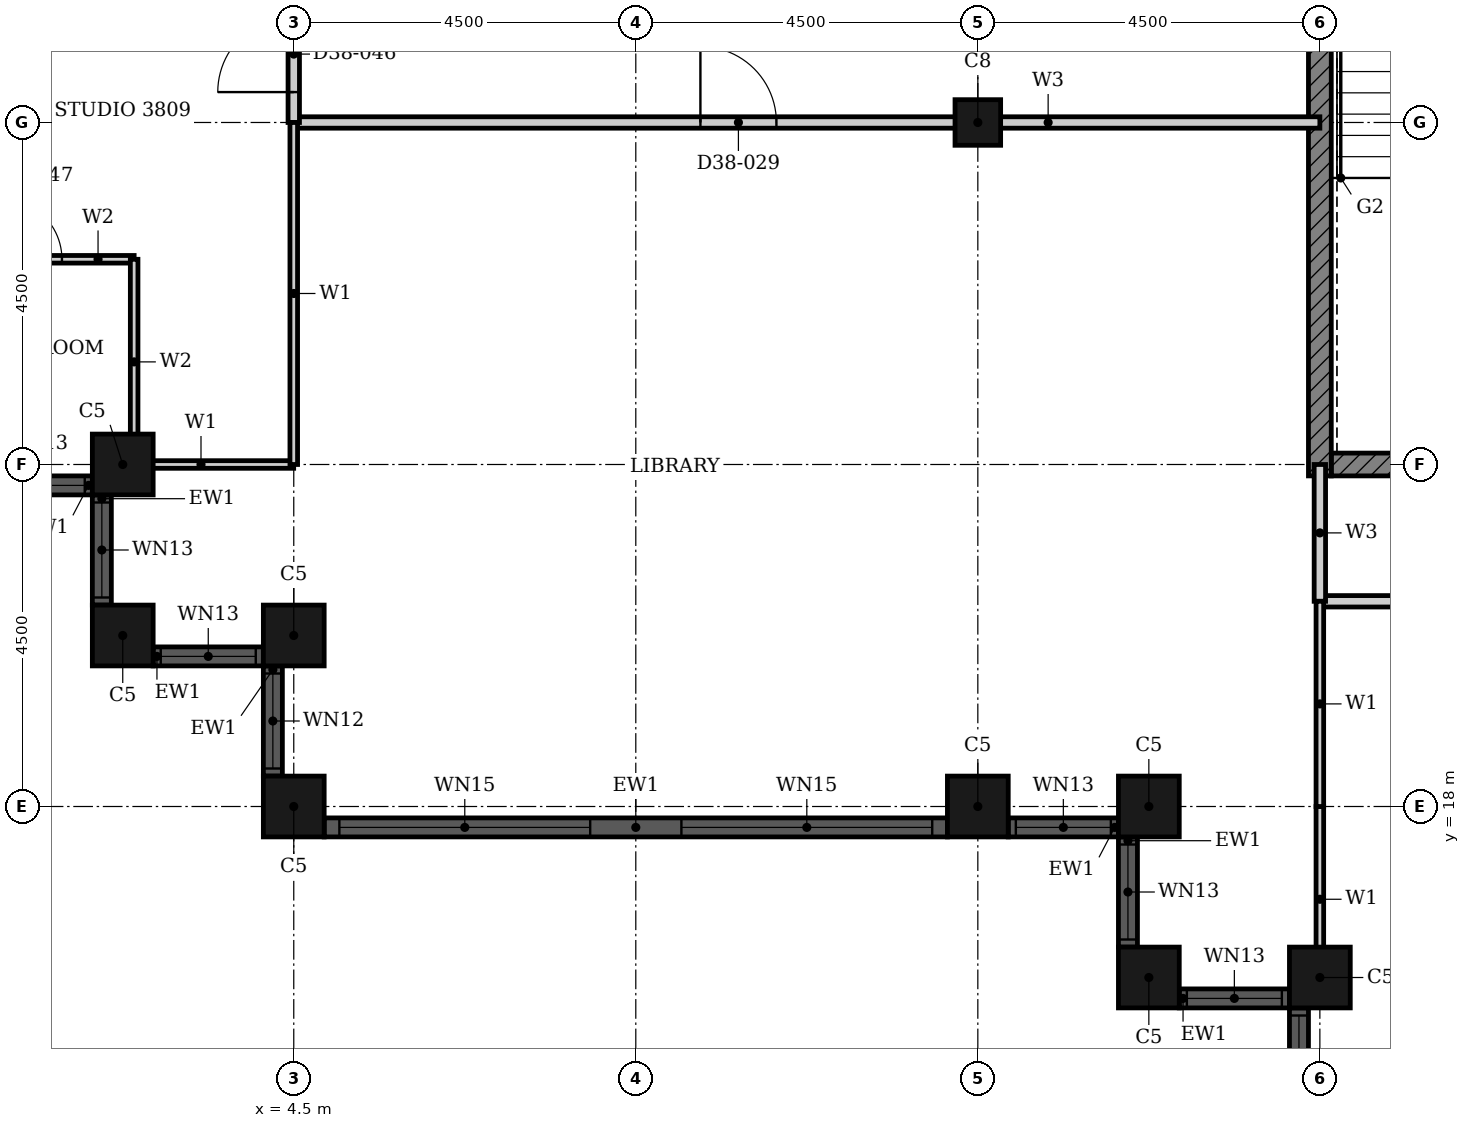
"""IFC4 building model, lengths in metres.
Left out: names, types, materials, properties, quantities, classifications, styles, units other than length and angle.
Written with IfcOpenShell. Run it as: python <this file> out.ifc"""

import sys

from ifc_helpers import new_model, si_unit, direction, frame, frame_2d, origin, origin_2d, place, context, subcontext, project, spatial, rectangle, hollow_rectangle, extrude, element, fill, save


model = new_model("IFC4")
c1 = context("Model", 3, precision=1e-05, world=origin(), true_north=direction((0.0, 1.0)))
c2 = subcontext(c1, "Body", "Model", "MODEL_VIEW")
j1 = project(units=[si_unit("LENGTHUNIT", "METRE"), si_unit("PLANEANGLEUNIT", "RADIAN")], contexts=[c1])
p1 = place(None, origin())
s1 = spatial("IfcSite", under=j1, at=p1, CompositionType="ELEMENT")
p2 = place(p1, origin())
s2 = spatial("IfcBuilding", under=s1, at=p2, CompositionType="ELEMENT")
p3 = place(p2, frame((0.0, 0.0, 154.3)))
s3 = spatial("IfcBuildingStorey", under=s2, at=p3, CompositionType="ELEMENT", Elevation=154.3)
for number, where, z_axis, x_axis in (
    (1, (2.25, 22.5, 0.0), (0.0, 0.0, 1.0), (1.0, 0.0, 0.0)),
    (2, (2.25, 20.25, 0.0), (0.0, 0.0, 1.0), (1.0, 0.0, 0.0)),
    (3, (4.5, 20.25, 0.0), (0.0, 0.0, 1.0), (1.0, 0.0, 0.0)),
    (4, (4.5, 18.0, 0.0), (0.0, 0.0, 1.0), (1.0, 0.0, 0.0)),
    (5, (13.5, 18.0, 0.0), (0.0, 0.0, 1.0), (1.0, 0.0, 0.0)),
    (6, (15.75, 18.0, 0.0), (0.0, 0.0, 1.0), (1.0, 0.0, 0.0)),
    (7, (15.75, 15.75, 0.0), (0.0, 0.0, 1.0), (1.0, 0.0, 0.0)),
    (8, (18.0, 15.75, 0.0), (0.0, 0.0, 1.0), (1.0, 0.0, 0.0)),
):
    element("IfcColumn", number, at=place(p3, frame(where, z_axis=z_axis, x_axis=x_axis)), inside=s3, PredefinedType="COLUMN", context=c2, shape_type="SweptSolid", body=[
        extrude(hollow_rectangle(XDim=0.8, YDim=0.8, WallThickness=0.025, at=origin_2d()), origin(), (0.0, 0.0, 1.0), 3.7),
    ])
p4 = place(p3, frame((13.5, 27.0, 0.0), z_axis=(0.0, 0.0, 1.0), x_axis=(1.0, 0.0, 0.0)))
e9 = element("IfcColumn", 9, at=p4, inside=s3, PredefinedType="COLUMN", context=c2, shape_type="SweptSolid", body=[
    extrude(hollow_rectangle(XDim=0.6, YDim=0.6, WallThickness=0.02, at=origin_2d()), origin(), (0.0, 0.0, 1.0), 3.7),
])
p5 = place(p3, frame((0.4, 22.225, 0.0), z_axis=(0.0, 0.0, 1.0), x_axis=(1.0, 0.0, 0.0)))
e10 = element("IfcWall", 10, at=p5, inside=s3, PredefinedType="SOLIDWALL", context=c2, shape_type="SweptSolid", body=[
    extrude(rectangle(XDim=1.45, YDim=0.25, at=frame_2d((0.725, 0.0))), origin(), (0.0, 0.0, 1.0), 3.7),
])
p6 = place(p5, frame((0.1, 0.0, 0.9)))
e11 = element("IfcOpeningElement", 11, at=p6, cuts=e10, PredefinedType="OPENING", context=c2, shape_type="SweptSolid", body=[
    extrude(rectangle(XDim=1.25, YDim=1.85, at=frame_2d((0.625, 0.925))), frame((0.0, 0.135, 0.0), z_axis=(0.0, -1.0, 0.0), x_axis=(1.0, 0.0, 0.0)), (0.0, 0.0, 1.0), 0.27),
])
p7 = place(p3, frame((1.975, 22.1, 0.0), z_axis=(0.0, 0.0, 1.0), x_axis=(0.0, -1.0, 0.0)))
e12 = element("IfcWall", 12, at=p7, inside=s3, PredefinedType="SOLIDWALL", context=c2, shape_type="SweptSolid", body=[
    extrude(rectangle(XDim=1.45, YDim=0.25, at=frame_2d((0.725, 0.0))), origin(), (0.0, 0.0, 1.0), 3.7),
])
p8 = place(p7, frame((0.1, 0.0, 0.9)))
e13 = element("IfcOpeningElement", 13, at=p8, cuts=e12, PredefinedType="OPENING", context=c2, shape_type="SweptSolid", body=[
    extrude(rectangle(XDim=1.25, YDim=1.85, at=frame_2d((0.625, 0.925))), frame((0.0, 0.135, 0.0), z_axis=(0.0, -1.0, 0.0), x_axis=(1.0, 0.0, 0.0)), (0.0, 0.0, 1.0), 0.27),
])
p9 = place(p3, frame((2.65, 19.975, 0.0), z_axis=(0.0, 0.0, 1.0), x_axis=(1.0, 0.0, 0.0)))
e14 = element("IfcWall", 14, at=p9, inside=s3, PredefinedType="SOLIDWALL", context=c2, shape_type="SweptSolid", body=[
    extrude(rectangle(XDim=1.45, YDim=0.25, at=frame_2d((0.725, 0.0))), origin(), (0.0, 0.0, 1.0), 3.7),
])
p10 = place(p9, frame((0.1, 0.0, 0.9)))
e15 = element("IfcOpeningElement", 15, at=p10, cuts=e14, PredefinedType="OPENING", context=c2, shape_type="SweptSolid", body=[
    extrude(rectangle(XDim=1.25, YDim=1.85, at=frame_2d((0.625, 0.925))), frame((0.0, 0.135, 0.0), z_axis=(0.0, -1.0, 0.0), x_axis=(1.0, 0.0, 0.0)), (0.0, 0.0, 1.0), 0.27),
])
p11 = place(p3, frame((4.225, 19.85, 0.0), z_axis=(0.0, 0.0, 1.0), x_axis=(0.0, -1.0, 0.0)))
e16 = element("IfcWall", 16, at=p11, inside=s3, PredefinedType="SOLIDWALL", context=c2, shape_type="SweptSolid", body=[
    extrude(rectangle(XDim=1.45, YDim=0.25, at=frame_2d((0.725, 0.0))), origin(), (0.0, 0.0, 1.0), 3.7),
])
p12 = place(p11, frame((0.1, 0.0, 0.9)))
e17 = element("IfcOpeningElement", 17, at=p12, cuts=e16, PredefinedType="OPENING", context=c2, shape_type="SweptSolid", body=[
    extrude(rectangle(XDim=1.25, YDim=2.08, at=frame_2d((0.625, 1.04))), frame((0.0, 0.135, 0.0), z_axis=(0.0, -1.0, 0.0), x_axis=(1.0, 0.0, 0.0)), (0.0, 0.0, 1.0), 0.27),
])
p13 = place(p3, frame((4.9, 17.725, 0.0), z_axis=(0.0, 0.0, 1.0), x_axis=(1.0, 0.0, 0.0)))
e18 = element("IfcWall", 18, at=p13, inside=s3, PredefinedType="SOLIDWALL", context=c2, shape_type="SweptSolid", body=[
    extrude(rectangle(XDim=8.2, YDim=0.25, at=frame_2d((4.1, 0.0))), origin(), (0.0, 0.0, 1.0), 3.7),
])
p14 = place(p13, frame((0.2, 0.0, 0.45)))
e19 = element("IfcOpeningElement", 19, at=p14, cuts=e18, PredefinedType="OPENING", context=c2, shape_type="SweptSolid", body=[
    extrude(rectangle(XDim=3.3, YDim=2.3, at=frame_2d((1.65, 1.15))), frame((0.0, 0.135, 0.0), z_axis=(0.0, -1.0, 0.0), x_axis=(1.0, 0.0, 0.0)), (0.0, 0.0, 1.0), 0.27),
])
p15 = place(p13, frame((4.7, 0.0, 0.45)))
e20 = element("IfcOpeningElement", 20, at=p15, cuts=e18, PredefinedType="OPENING", context=c2, shape_type="SweptSolid", body=[
    extrude(rectangle(XDim=3.3, YDim=2.3, at=frame_2d((1.65, 1.15))), frame((0.0, 0.135, 0.0), z_axis=(0.0, -1.0, 0.0), x_axis=(1.0, 0.0, 0.0)), (0.0, 0.0, 1.0), 0.27),
])
p16 = place(p3, frame((13.9, 17.725, 0.0), z_axis=(0.0, 0.0, 1.0), x_axis=(1.0, 0.0, 0.0)))
e21 = element("IfcWall", 21, at=p16, inside=s3, PredefinedType="SOLIDWALL", context=c2, shape_type="SweptSolid", body=[
    extrude(rectangle(XDim=1.45, YDim=0.25, at=frame_2d((0.725, 0.0))), origin(), (0.0, 0.0, 1.0), 3.7),
])
p17 = place(p16, frame((0.1, 0.0, 0.9)))
e22 = element("IfcOpeningElement", 22, at=p17, cuts=e21, PredefinedType="OPENING", context=c2, shape_type="SweptSolid", body=[
    extrude(rectangle(XDim=1.25, YDim=1.85, at=frame_2d((0.625, 0.925))), frame((0.0, 0.135, 0.0), z_axis=(0.0, -1.0, 0.0), x_axis=(1.0, 0.0, 0.0)), (0.0, 0.0, 1.0), 0.27),
])
p18 = place(p3, frame((15.475, 17.6, 0.0), z_axis=(0.0, 0.0, 1.0), x_axis=(0.0, -1.0, 0.0)))
e23 = element("IfcWall", 23, at=p18, inside=s3, PredefinedType="SOLIDWALL", context=c2, shape_type="SweptSolid", body=[
    extrude(rectangle(XDim=1.45, YDim=0.25, at=frame_2d((0.725, 0.0))), origin(), (0.0, 0.0, 1.0), 3.7),
])
p19 = place(p18, frame((0.1, 0.0, 0.9)))
e24 = element("IfcOpeningElement", 24, at=p19, cuts=e23, PredefinedType="OPENING", context=c2, shape_type="SweptSolid", body=[
    extrude(rectangle(XDim=1.25, YDim=1.85, at=frame_2d((0.625, 0.925))), frame((0.0, 0.135, 0.0), z_axis=(0.0, -1.0, 0.0), x_axis=(1.0, 0.0, 0.0)), (0.0, 0.0, 1.0), 0.27),
])
p20 = place(p3, frame((16.15, 15.475, 0.0), z_axis=(0.0, 0.0, 1.0), x_axis=(1.0, 0.0, 0.0)))
e25 = element("IfcWall", 25, at=p20, inside=s3, PredefinedType="SOLIDWALL", context=c2, shape_type="SweptSolid", body=[
    extrude(rectangle(XDim=1.45, YDim=0.25, at=frame_2d((0.725, 0.0))), origin(), (0.0, 0.0, 1.0), 3.7),
])
p21 = place(p20, frame((0.1, 0.0, 0.9)))
e26 = element("IfcOpeningElement", 26, at=p21, cuts=e25, PredefinedType="OPENING", context=c2, shape_type="SweptSolid", body=[
    extrude(rectangle(XDim=1.25, YDim=1.85, at=frame_2d((0.625, 0.925))), frame((0.0, 0.135, 0.0), z_axis=(0.0, -1.0, 0.0), x_axis=(1.0, 0.0, 0.0)), (0.0, 0.0, 1.0), 0.27),
])
p22 = place(p3, frame((17.725, 15.35, 0.0), z_axis=(0.0, 0.0, 1.0), x_axis=(0.0, -1.0, 0.0)))
e27 = element("IfcWall", 27, at=p22, inside=s3, PredefinedType="SOLIDWALL", context=c2, shape_type="SweptSolid", body=[
    extrude(rectangle(XDim=1.45, YDim=0.25, at=frame_2d((0.725, 0.0))), origin(), (0.0, 0.0, 1.0), 3.7),
])
p23 = place(p22, frame((0.1, 0.0, 0.9)))
e28 = element("IfcOpeningElement", 28, at=p23, cuts=e27, PredefinedType="OPENING", context=c2, shape_type="SweptSolid", body=[
    extrude(rectangle(XDim=1.25, YDim=1.85, at=frame_2d((0.625, 0.925))), frame((0.0, 0.135, 0.0), z_axis=(0.0, -1.0, 0.0), x_axis=(1.0, 0.0, 0.0)), (0.0, 0.0, 1.0), 0.27),
])
p24 = place(p3, frame((18.15, 22.5, 0.0), z_axis=(0.0, 0.0, 1.0), x_axis=(1.0, 0.0, 0.0)))
e29 = element("IfcWall", 29, at=p24, inside=s3, PredefinedType="SHEAR", context=c2, shape_type="SweptSolid", body=[
    extrude(rectangle(XDim=4.225, YDim=0.3, at=frame_2d((2.113, 0.0))), origin(), (0.0, 0.0, 1.0), 3.4),
])
p25 = place(p3, frame((18.0, 22.35, 0.0), z_axis=(0.0, 0.0, 1.0), x_axis=(0.0, 1.0, 0.0)))
e30 = element("IfcWall", 30, at=p25, inside=s3, PredefinedType="SHEAR", context=c2, shape_type="SweptSolid", body=[
    extrude(rectangle(XDim=9.3, YDim=0.3, at=frame_2d((4.65, 0.0))), origin(), (0.0, 0.0, 1.0), 3.4),
])
p26 = place(p3, frame((18.0, 20.7, 0.0), z_axis=(0.0, 0.0, 1.0), x_axis=(1.0, 0.0, 0.0)))
e31 = element("IfcWall", 31, at=p26, inside=s3, PredefinedType="PARTITIONING", context=c2, shape_type="SweptSolid", body=[
    extrude(rectangle(XDim=13.5, YDim=0.15, at=frame_2d((6.75, 0.0))), origin(), (0.0, 0.0, 1.0), 3.4),
])
p27 = place(p26, frame((6.25, 0.0, 0.0)))
e32 = element("IfcOpeningElement", 32, at=p27, cuts=e31, PredefinedType="OPENING", context=c2, shape_type="SweptSolid", body=[
    extrude(rectangle(XDim=1.0, YDim=2.1, at=frame_2d((0.5, 1.05))), frame((0.0, 0.085, 0.0), z_axis=(0.0, -1.0, 0.0), x_axis=(1.0, 0.0, 0.0)), (0.0, 0.0, 1.0), 0.17),
])
p28 = place(p3, frame((4.5, 27.0, 0.0), z_axis=(0.0, 0.0, 1.0), x_axis=(1.0, 0.0, 0.0)))
e33 = element("IfcWall", 33, at=p28, inside=s3, PredefinedType="PARTITIONING", context=c2, shape_type="SweptSolid", body=[
    extrude(rectangle(XDim=13.5, YDim=0.15, at=frame_2d((6.75, 0.0))), origin(), (0.0, 0.0, 1.0), 2.68),
])
p29 = place(p28, frame((5.35, 0.0, 0.0)))
e34 = element("IfcOpeningElement", 34, at=p29, cuts=e33, PredefinedType="OPENING", context=c2, shape_type="SweptSolid", body=[
    extrude(rectangle(XDim=1.0, YDim=2.1, at=frame_2d((0.5, 1.05))), frame((0.0, 0.085, 0.0), z_axis=(0.0, -1.0, 0.0), x_axis=(1.0, 0.0, 0.0)), (0.0, 0.0, 1.0), 0.17),
])
p30 = place(p3, frame((18.0, 20.7, 0.0), z_axis=(0.0, 0.0, 1.0), x_axis=(0.0, 1.0, 0.0)))
e35 = element("IfcWall", 35, at=p30, inside=s3, PredefinedType="PARTITIONING", context=c2, shape_type="SweptSolid", body=[
    extrude(rectangle(XDim=1.8, YDim=0.15, at=frame_2d((0.9, 0.0))), origin(), (0.0, 0.0, 1.0), 3.4),
])
p31 = place(p3, frame((4.5, 27.0, 0.0), z_axis=(0.0, 0.0, 1.0), x_axis=(0.0, 1.0, 0.0)))
e36 = element("IfcWall", 36, at=p31, inside=s3, PredefinedType="PARTITIONING", context=c2, shape_type="SweptSolid", body=[
    extrude(rectangle(XDim=1.8, YDim=0.15, at=frame_2d((0.9, 0.0))), origin(), (0.0, 0.0, 1.0), 3.4),
])
p32 = place(p31, frame((0.4, 0.0, 0.0)))
e37 = element("IfcOpeningElement", 37, at=p32, cuts=e36, PredefinedType="OPENING", context=c2, shape_type="SweptSolid", body=[
    extrude(rectangle(XDim=1.0, YDim=2.2, at=frame_2d((0.5, 1.1))), frame((0.0, 0.085, 0.0), z_axis=(0.0, -1.0, 0.0), x_axis=(1.0, 0.0, 0.0)), (0.0, 0.0, 1.0), 0.17),
])
p33 = place(p3, frame((2.06, 22.5, 0.0), z_axis=(0.0, 0.0, 1.0), x_axis=(1.0, 0.0, 0.0)))
e38 = element("IfcWall", 38, at=p33, inside=s3, PredefinedType="PARTITIONING", context=c2, shape_type="SweptSolid", body=[
    extrude(rectangle(XDim=2.439, YDim=0.1, at=frame_2d((1.219, 0.0))), origin(), (0.0, 0.0, 1.0), 2.68),
])
p34 = place(p3, frame((18.0, 15.56, 0.0), z_axis=(0.0, 0.0, 1.0), x_axis=(0.0, 1.0, 0.0)))
e39 = element("IfcWall", 39, at=p34, inside=s3, PredefinedType="PARTITIONING", context=c2, shape_type="SweptSolid", body=[
    extrude(rectangle(XDim=2.439, YDim=0.1, at=frame_2d((1.219, 0.0))), origin(), (0.0, 0.0, 1.0), 3.4),
])
p35 = place(p3, frame((18.0, 18.0, 0.0), z_axis=(0.0, 0.0, 1.0), x_axis=(0.0, 1.0, 0.0)))
e40 = element("IfcWall", 40, at=p35, inside=s3, PredefinedType="PARTITIONING", context=c2, shape_type="SweptSolid", body=[
    extrude(rectangle(XDim=2.7, YDim=0.1, at=frame_2d((1.35, 0.0))), origin(), (0.0, 0.0, 1.0), 3.4),
])
p36 = place(p3, frame((4.5, 22.5, 0.0), z_axis=(0.0, 0.0, 1.0), x_axis=(0.0, 1.0, 0.0)))
e41 = element("IfcWall", 41, at=p36, inside=s3, PredefinedType="PARTITIONING", context=c2, shape_type="SweptSolid", body=[
    extrude(rectangle(XDim=4.5, YDim=0.1, at=frame_2d((2.25, 0.0))), origin(), (0.0, 0.0, 1.0), 3.4),
])
p37 = place(p3, frame((-0.15, 25.2, 0.0), z_axis=(0.0, 0.0, 1.0), x_axis=(1.0, 0.0, 0.0)))
e42 = element("IfcWall", 42, at=p37, inside=s3, PredefinedType="PARTITIONING", context=c2, shape_type="SweptSolid", body=[
    extrude(rectangle(XDim=2.55, YDim=0.1, at=frame_2d((1.275, 0.0))), origin(), (0.0, 0.0, 1.0), 3.4),
])
p38 = place(p37, frame((0.8, 0.0, 0.0)))
e43 = element("IfcOpeningElement", 43, at=p38, cuts=e42, PredefinedType="OPENING", context=c2, shape_type="SweptSolid", body=[
    extrude(rectangle(XDim=0.8, YDim=2.1, at=frame_2d((0.4, 1.05))), frame((0.0, 0.06, 0.0), z_axis=(0.0, -1.0, 0.0), x_axis=(1.0, 0.0, 0.0)), (0.0, 0.0, 1.0), 0.12),
])
p39 = place(p3, frame((2.4, 22.5, 0.0), z_axis=(0.0, 0.0, 1.0), x_axis=(0.0, 1.0, 0.0)))
e44 = element("IfcWall", 44, at=p39, inside=s3, PredefinedType="PARTITIONING", context=c2, shape_type="SweptSolid", body=[
    extrude(rectangle(XDim=2.7, YDim=0.1, at=frame_2d((1.35, 0.0))), origin(), (0.0, 0.0, 1.0), 3.4),
])
p40 = place(p6, origin())
e45 = element("IfcWindow", 45, at=p40, inside=s3, PartitioningType="SINGLE_PANEL", PredefinedType="WINDOW", context=c2, shape_type="SweptSolid", body=[
    extrude(rectangle(XDim=1.25, YDim=1.85, at=frame_2d((0.625, 0.925))), frame((0.0, 0.03, 0.0), z_axis=(0.0, -1.0, 0.0), x_axis=(1.0, 0.0, 0.0)), (0.0, 0.0, 1.0), 0.06),
])
fill(e11, e45)
p41 = place(p8, origin())
e46 = element("IfcWindow", 46, at=p41, inside=s3, PartitioningType="SINGLE_PANEL", PredefinedType="WINDOW", context=c2, shape_type="SweptSolid", body=[
    extrude(rectangle(XDim=1.25, YDim=1.85, at=frame_2d((0.625, 0.925))), frame((0.0, 0.03, 0.0), z_axis=(0.0, -1.0, 0.0), x_axis=(1.0, 0.0, 0.0)), (0.0, 0.0, 1.0), 0.06),
])
fill(e13, e46)
p42 = place(p10, origin())
e47 = element("IfcWindow", 47, at=p42, inside=s3, PartitioningType="SINGLE_PANEL", PredefinedType="WINDOW", context=c2, shape_type="SweptSolid", body=[
    extrude(rectangle(XDim=1.25, YDim=1.85, at=frame_2d((0.625, 0.925))), frame((0.0, 0.03, 0.0), z_axis=(0.0, -1.0, 0.0), x_axis=(1.0, 0.0, 0.0)), (0.0, 0.0, 1.0), 0.06),
])
fill(e15, e47)
p43 = place(p12, origin())
e48 = element("IfcWindow", 48, at=p43, inside=s3, PartitioningType="SINGLE_PANEL", PredefinedType="WINDOW", context=c2, shape_type="SweptSolid", body=[
    extrude(rectangle(XDim=1.25, YDim=2.08, at=frame_2d((0.625, 1.04))), frame((0.0, 0.03, 0.0), z_axis=(0.0, -1.0, 0.0), x_axis=(1.0, 0.0, 0.0)), (0.0, 0.0, 1.0), 0.06),
])
fill(e17, e48)
p44 = place(p14, origin())
e49 = element("IfcWindow", 49, at=p44, inside=s3, PartitioningType="SINGLE_PANEL", PredefinedType="WINDOW", context=c2, shape_type="SweptSolid", body=[
    extrude(rectangle(XDim=3.3, YDim=2.3, at=frame_2d((1.65, 1.15))), frame((0.0, 0.03, 0.0), z_axis=(0.0, -1.0, 0.0), x_axis=(1.0, 0.0, 0.0)), (0.0, 0.0, 1.0), 0.06),
])
fill(e19, e49)
p45 = place(p15, origin())
e50 = element("IfcWindow", 50, at=p45, inside=s3, PartitioningType="SINGLE_PANEL", PredefinedType="WINDOW", context=c2, shape_type="SweptSolid", body=[
    extrude(rectangle(XDim=3.3, YDim=2.3, at=frame_2d((1.65, 1.15))), frame((0.0, 0.03, 0.0), z_axis=(0.0, -1.0, 0.0), x_axis=(1.0, 0.0, 0.0)), (0.0, 0.0, 1.0), 0.06),
])
fill(e20, e50)
p46 = place(p17, origin())
e51 = element("IfcWindow", 51, at=p46, inside=s3, PartitioningType="SINGLE_PANEL", PredefinedType="WINDOW", context=c2, shape_type="SweptSolid", body=[
    extrude(rectangle(XDim=1.25, YDim=1.85, at=frame_2d((0.625, 0.925))), frame((0.0, 0.03, 0.0), z_axis=(0.0, -1.0, 0.0), x_axis=(1.0, 0.0, 0.0)), (0.0, 0.0, 1.0), 0.06),
])
fill(e22, e51)
p47 = place(p19, origin())
e52 = element("IfcWindow", 52, at=p47, inside=s3, PartitioningType="SINGLE_PANEL", PredefinedType="WINDOW", context=c2, shape_type="SweptSolid", body=[
    extrude(rectangle(XDim=1.25, YDim=1.85, at=frame_2d((0.625, 0.925))), frame((0.0, 0.03, 0.0), z_axis=(0.0, -1.0, 0.0), x_axis=(1.0, 0.0, 0.0)), (0.0, 0.0, 1.0), 0.06),
])
fill(e24, e52)
p48 = place(p21, origin())
e53 = element("IfcWindow", 53, at=p48, inside=s3, PartitioningType="SINGLE_PANEL", PredefinedType="WINDOW", context=c2, shape_type="SweptSolid", body=[
    extrude(rectangle(XDim=1.25, YDim=1.85, at=frame_2d((0.625, 0.925))), frame((0.0, 0.03, 0.0), z_axis=(0.0, -1.0, 0.0), x_axis=(1.0, 0.0, 0.0)), (0.0, 0.0, 1.0), 0.06),
])
fill(e26, e53)
p49 = place(p23, origin())
e54 = element("IfcWindow", 54, at=p49, inside=s3, PartitioningType="SINGLE_PANEL", PredefinedType="WINDOW", context=c2, shape_type="SweptSolid", body=[
    extrude(rectangle(XDim=1.25, YDim=1.85, at=frame_2d((0.625, 0.925))), frame((0.0, 0.03, 0.0), z_axis=(0.0, -1.0, 0.0), x_axis=(1.0, 0.0, 0.0)), (0.0, 0.0, 1.0), 0.06),
])
fill(e28, e54)
p50 = place(p29, origin())
e55 = element("IfcDoor", 55, at=p50, inside=s3, OperationType="SINGLE_SWING_LEFT", PredefinedType="DOOR", context=c2, shape_type="SweptSolid", body=[
    extrude(rectangle(XDim=1.0, YDim=2.1, at=frame_2d((0.5, 1.05))), frame((0.0, 0.025, 0.0), z_axis=(0.0, -1.0, 0.0), x_axis=(1.0, 0.0, 0.0)), (0.0, 0.0, 1.0), 0.05),
])
fill(e34, e55)
p51 = place(p32, origin())
e56 = element("IfcDoor", 56, at=p51, inside=s3, OperationType="SINGLE_SWING_LEFT", PredefinedType="DOOR", context=c2, shape_type="SweptSolid", body=[
    extrude(rectangle(XDim=1.0, YDim=2.2, at=frame_2d((0.5, 1.1))), frame((0.0, 0.025, 0.0), z_axis=(0.0, -1.0, 0.0), x_axis=(1.0, 0.0, 0.0)), (0.0, 0.0, 1.0), 0.05),
])
fill(e37, e56)
p52 = place(p38, origin())
e57 = element("IfcDoor", 57, at=p52, inside=s3, OperationType="SINGLE_SWING_LEFT", PredefinedType="DOOR", context=c2, shape_type="SweptSolid", body=[
    extrude(rectangle(XDim=0.8, YDim=2.1, at=frame_2d((0.4, 1.05))), frame((0.0, 0.025, 0.0), z_axis=(0.0, -1.0, 0.0), x_axis=(1.0, 0.0, 0.0)), (0.0, 0.0, 1.0), 0.05),
])
fill(e43, e57)
save(model, sys.argv[1])
